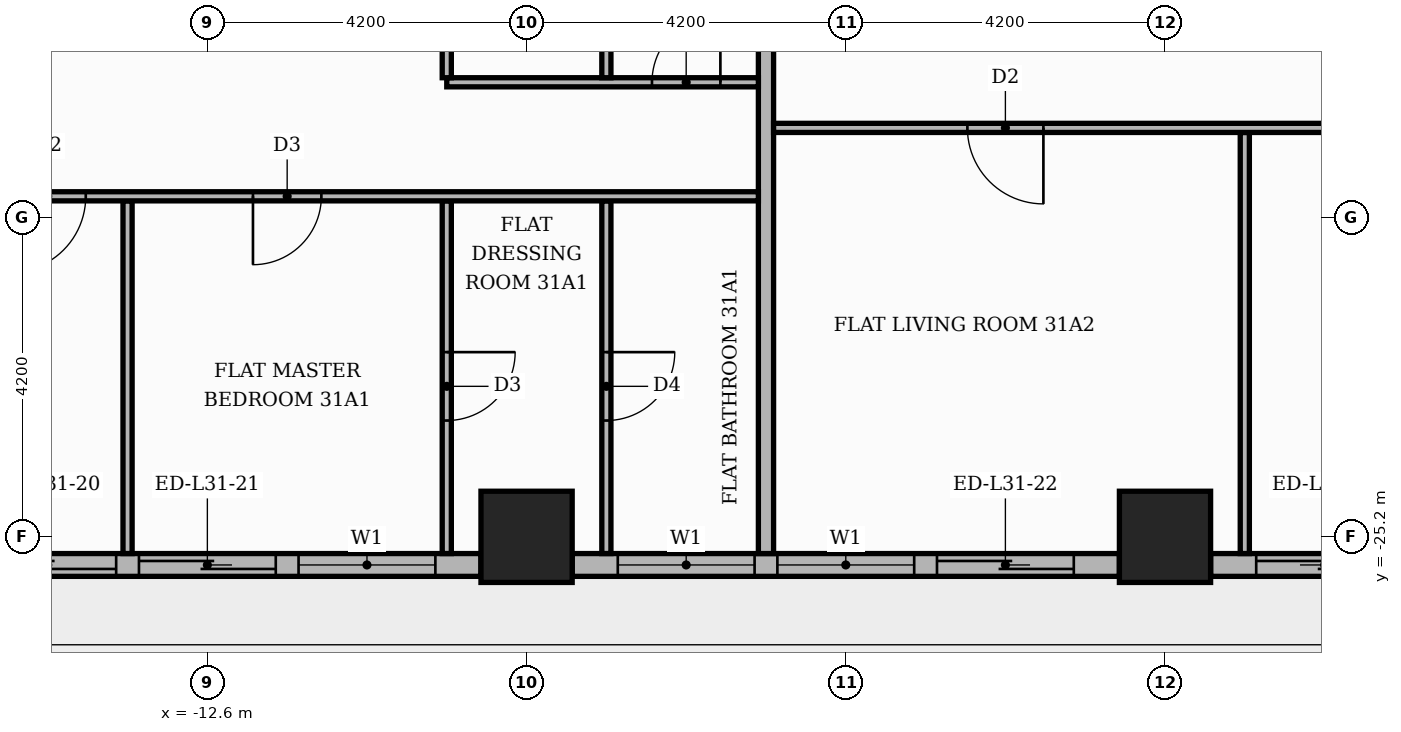
"""IFC4 building model, lengths in metres.
Left out: names, types, materials, properties, quantities, classifications, styles, units other than length and angle.
Written with IfcOpenShell. Run it as: python <this file> out.ifc"""

import sys

from ifc_helpers import new_model, si_unit, direction, frame, frame_2d, origin, origin_2d, place, context, subcontext, project, spatial, rectangle, extrude, element, fill, save


model = new_model("IFC4")
c1 = context("Model", 3, precision=1e-05, world=origin(), true_north=direction((0.0, 1.0)))
c2 = subcontext(c1, "Body", "Model", "MODEL_VIEW")
j1 = project(units=[si_unit("LENGTHUNIT", "METRE"), si_unit("PLANEANGLEUNIT", "RADIAN")], contexts=[c1])
p1 = place(None, origin())
s1 = spatial("IfcSite", under=j1, at=p1, CompositionType="ELEMENT")
p2 = place(p1, origin())
s2 = spatial("IfcBuilding", under=s1, at=p2, CompositionType="ELEMENT")
p3 = place(p2, frame((0.0, 0.0, 133.8)))
s3 = spatial("IfcBuildingStorey", under=s2, at=p3, CompositionType="ELEMENT", Elevation=133.8)
for number, where, z_axis, x_axis in (
    (1, (0.0, -25.2, 0.0), (0.0, 0.0, 1.0), (1.0, 0.0, 0.0)),
    (2, (-8.4, -25.2, 0.0), (0.0, 0.0, 1.0), (1.0, 0.0, 0.0)),
):
    element("IfcColumn", number, at=place(p3, frame(where, z_axis=z_axis, x_axis=x_axis)), inside=s3, PredefinedType="COLUMN", context=c2, shape_type="SweptSolid", body=[
        extrude(rectangle(XDim=1.2, YDim=1.2, at=origin_2d()), origin(), (0.0, 0.0, 1.0), 3.9),
    ])
p4 = place(p3, frame((-16.2, -25.57, 0.0), z_axis=(0.0, 0.0, 1.0), x_axis=(1.0, 0.0, 0.0)))
e3 = element("IfcWall", 3, at=p4, inside=s3, PredefinedType="STANDARD", context=c2, shape_type="SweptSolid", body=[
    extrude(rectangle(XDim=7.2, YDim=0.3, at=frame_2d((3.6, 0.0))), origin(), (0.0, 0.0, 1.0), 3.48),
])
p5 = place(p4, frame((0.6, 0.0, 0.0)))
e4 = element("IfcOpeningElement", 4, at=p5, cuts=e3, PredefinedType="OPENING", context=c2, shape_type="SweptSolid", body=[
    extrude(rectangle(XDim=1.8, YDim=2.4, at=frame_2d((0.9, 1.2))), frame((0.0, 0.16, 0.0), z_axis=(0.0, -1.0, 0.0), x_axis=(1.0, 0.0, 0.0)), (0.0, 0.0, 1.0), 0.32),
])
p6 = place(p4, frame((2.7, 0.0, 0.0)))
e5 = element("IfcOpeningElement", 5, at=p6, cuts=e3, PredefinedType="OPENING", context=c2, shape_type="SweptSolid", body=[
    extrude(rectangle(XDim=1.8, YDim=2.4, at=frame_2d((0.9, 1.2))), frame((0.0, 0.16, 0.0), z_axis=(0.0, -1.0, 0.0), x_axis=(1.0, 0.0, 0.0)), (0.0, 0.0, 1.0), 0.32),
])
p7 = place(p4, frame((4.8, 0.0, 0.9)))
e6 = element("IfcOpeningElement", 6, at=p7, cuts=e3, PredefinedType="OPENING", context=c2, shape_type="SweptSolid", body=[
    extrude(rectangle(XDim=1.8, YDim=2.1, at=frame_2d((0.9, 1.05))), frame((0.0, 0.16, 0.0), z_axis=(0.0, -1.0, 0.0), x_axis=(1.0, 0.0, 0.0)), (0.0, 0.0, 1.0), 0.32),
])
p8 = place(p3, frame((-7.8, -25.57, 0.0), z_axis=(0.0, 0.0, 1.0), x_axis=(1.0, 0.0, 0.0)))
e7 = element("IfcWall", 7, at=p8, inside=s3, PredefinedType="STANDARD", context=c2, shape_type="SweptSolid", body=[
    extrude(rectangle(XDim=7.2, YDim=0.3, at=frame_2d((3.6, 0.0))), origin(), (0.0, 0.0, 1.0), 3.48),
])
p9 = place(p8, frame((0.6, 0.0, 0.9)))
e8 = element("IfcOpeningElement", 8, at=p9, cuts=e7, PredefinedType="OPENING", context=c2, shape_type="SweptSolid", body=[
    extrude(rectangle(XDim=1.8, YDim=2.1, at=frame_2d((0.9, 1.05))), frame((0.0, 0.16, 0.0), z_axis=(0.0, -1.0, 0.0), x_axis=(1.0, 0.0, 0.0)), (0.0, 0.0, 1.0), 0.32),
])
p10 = place(p8, frame((2.7, 0.0, 0.9)))
e9 = element("IfcOpeningElement", 9, at=p10, cuts=e7, PredefinedType="OPENING", context=c2, shape_type="SweptSolid", body=[
    extrude(rectangle(XDim=1.8, YDim=2.1, at=frame_2d((0.9, 1.05))), frame((0.0, 0.16, 0.0), z_axis=(0.0, -1.0, 0.0), x_axis=(1.0, 0.0, 0.0)), (0.0, 0.0, 1.0), 0.32),
])
p11 = place(p8, frame((4.8, 0.0, 0.0)))
e10 = element("IfcOpeningElement", 10, at=p11, cuts=e7, PredefinedType="OPENING", context=c2, shape_type="SweptSolid", body=[
    extrude(rectangle(XDim=1.8, YDim=2.4, at=frame_2d((0.9, 1.2))), frame((0.0, 0.16, 0.0), z_axis=(0.0, -1.0, 0.0), x_axis=(1.0, 0.0, 0.0)), (0.0, 0.0, 1.0), 0.32),
])
p12 = place(p3, frame((0.6, -25.57, 0.0), z_axis=(0.0, 0.0, 1.0), x_axis=(1.0, 0.0, 0.0)))
e11 = element("IfcWall", 11, at=p12, inside=s3, PredefinedType="STANDARD", context=c2, shape_type="SweptSolid", body=[
    extrude(rectangle(XDim=7.2, YDim=0.3, at=frame_2d((3.6, 0.0))), origin(), (0.0, 0.0, 1.0), 3.48),
])
p13 = place(p12, frame((0.6, 0.0, 0.0)))
e12 = element("IfcOpeningElement", 12, at=p13, cuts=e11, PredefinedType="OPENING", context=c2, shape_type="SweptSolid", body=[
    extrude(rectangle(XDim=1.8, YDim=2.4, at=frame_2d((0.9, 1.2))), frame((0.0, 0.16, 0.0), z_axis=(0.0, -1.0, 0.0), x_axis=(1.0, 0.0, 0.0)), (0.0, 0.0, 1.0), 0.32),
])
p14 = place(p12, frame((2.7, 0.0, 0.9)))
e13 = element("IfcOpeningElement", 13, at=p14, cuts=e11, PredefinedType="OPENING", context=c2, shape_type="SweptSolid", body=[
    extrude(rectangle(XDim=1.8, YDim=2.1, at=frame_2d((0.9, 1.05))), frame((0.0, 0.16, 0.0), z_axis=(0.0, -1.0, 0.0), x_axis=(1.0, 0.0, 0.0)), (0.0, 0.0, 1.0), 0.32),
])
p15 = place(p12, frame((4.8, 0.0, 0.9)))
e14 = element("IfcOpeningElement", 14, at=p15, cuts=e11, PredefinedType="OPENING", context=c2, shape_type="SweptSolid", body=[
    extrude(rectangle(XDim=1.8, YDim=2.1, at=frame_2d((0.9, 1.05))), frame((0.0, 0.16, 0.0), z_axis=(0.0, -1.0, 0.0), x_axis=(1.0, 0.0, 0.0)), (0.0, 0.0, 1.0), 0.32),
])
p16 = place(p3, frame((-13.65, -25.42, 0.0), z_axis=(0.0, 0.0, 1.0), x_axis=(0.0, 1.0, 0.0)))
e15 = element("IfcWall", 15, at=p16, inside=s3, PredefinedType="PARTITIONING", context=c2, shape_type="SweptSolid", body=[
    extrude(rectangle(XDim=4.64, YDim=0.12, at=frame_2d((2.32, 0.0))), origin(), (0.0, 0.0, 1.0), 3.48),
])
p17 = place(p3, frame((-9.45, -25.42, 0.0), z_axis=(0.0, 0.0, 1.0), x_axis=(0.0, 1.0, 0.0)))
e16 = element("IfcWall", 16, at=p17, inside=s3, PredefinedType="PARTITIONING", context=c2, shape_type="SweptSolid", body=[
    extrude(rectangle(XDim=4.64, YDim=0.12, at=frame_2d((2.32, 0.0))), origin(), (0.0, 0.0, 1.0), 3.48),
])
p18 = place(p17, frame((1.75, 0.0, 0.0)))
e17 = element("IfcOpeningElement", 17, at=p18, cuts=e16, PredefinedType="OPENING", context=c2, shape_type="SweptSolid", body=[
    extrude(rectangle(XDim=0.9, YDim=2.1, at=frame_2d((0.45, 1.05))), frame((0.0, 0.07, 0.0), z_axis=(0.0, -1.0, 0.0), x_axis=(1.0, 0.0, 0.0)), (0.0, 0.0, 1.0), 0.14),
])
p19 = place(p3, frame((-7.35, -25.42, 0.0), z_axis=(0.0, 0.0, 1.0), x_axis=(0.0, 1.0, 0.0)))
e18 = element("IfcWall", 18, at=p19, inside=s3, PredefinedType="PARTITIONING", context=c2, shape_type="SweptSolid", body=[
    extrude(rectangle(XDim=4.64, YDim=0.12, at=frame_2d((2.32, 0.0))), origin(), (0.0, 0.0, 1.0), 3.48),
])
p20 = place(p19, frame((1.75, 0.0, 0.0)))
e19 = element("IfcOpeningElement", 19, at=p20, cuts=e18, PredefinedType="OPENING", context=c2, shape_type="SweptSolid", body=[
    extrude(rectangle(XDim=0.9, YDim=2.1, at=frame_2d((0.45, 1.05))), frame((0.0, 0.07, 0.0), z_axis=(0.0, -1.0, 0.0), x_axis=(1.0, 0.0, 0.0)), (0.0, 0.0, 1.0), 0.14),
])
p21 = place(p3, frame((-5.25, -25.42, 0.0), z_axis=(0.0, 0.0, 1.0), x_axis=(0.0, 1.0, 0.0)))
e20 = element("IfcWall", 20, at=p21, inside=s3, PredefinedType="PARTITIONING", context=c2, shape_type="SweptSolid", body=[
    extrude(rectangle(XDim=11.67, YDim=0.2, at=frame_2d((5.835, 0.0))), origin(), (0.0, 0.0, 1.0), 3.48),
])
p22 = place(p3, frame((1.05, -25.42, 0.0), z_axis=(0.0, 0.0, 1.0), x_axis=(0.0, 1.0, 0.0)))
e21 = element("IfcWall", 21, at=p22, inside=s3, PredefinedType="PARTITIONING", context=c2, shape_type="SweptSolid", body=[
    extrude(rectangle(XDim=5.54, YDim=0.12, at=frame_2d((2.77, 0.0))), origin(), (0.0, 0.0, 1.0), 3.48),
])
p23 = place(p3, frame((-25.42, -20.72, 0.0), z_axis=(0.0, 0.0, 1.0), x_axis=(1.0, 0.0, 0.0)))
e22 = element("IfcWall", 22, at=p23, inside=s3, PredefinedType="PARTITIONING", context=c2, shape_type="SweptSolid", body=[
    extrude(rectangle(XDim=20.07, YDim=0.12, at=frame_2d((10.035, 0.0))), origin(), (0.0, 0.0, 1.0), 3.48),
])
p24 = place(p23, frame((10.22, 0.0, 0.0)))
e23 = element("IfcOpeningElement", 23, at=p24, cuts=e22, PredefinedType="OPENING", context=c2, shape_type="SweptSolid", body=[
    extrude(rectangle(XDim=1.0, YDim=2.1, at=frame_2d((0.5, 1.05))), frame((0.0, 0.07, 0.0), z_axis=(0.0, -1.0, 0.0), x_axis=(1.0, 0.0, 0.0)), (0.0, 0.0, 1.0), 0.14),
])
p25 = place(p23, frame((13.42, 0.0, 0.0)))
e24 = element("IfcOpeningElement", 24, at=p25, cuts=e22, PredefinedType="OPENING", context=c2, shape_type="SweptSolid", body=[
    extrude(rectangle(XDim=0.9, YDim=2.1, at=frame_2d((0.45, 1.05))), frame((0.0, 0.07, 0.0), z_axis=(0.0, -1.0, 0.0), x_axis=(1.0, 0.0, 0.0)), (0.0, 0.0, 1.0), 0.14),
])
p26 = place(p3, frame((-5.15, -19.82, 0.0), z_axis=(0.0, 0.0, 1.0), x_axis=(1.0, 0.0, 0.0)))
e25 = element("IfcWall", 25, at=p26, inside=s3, PredefinedType="PARTITIONING", context=c2, shape_type="SweptSolid", body=[
    extrude(rectangle(XDim=18.7, YDim=0.12, at=frame_2d((9.35, 0.0))), origin(), (0.0, 0.0, 1.0), 3.48),
])
p27 = place(p26, frame((2.55, 0.0, 0.0)))
e26 = element("IfcOpeningElement", 26, at=p27, cuts=e25, PredefinedType="OPENING", context=c2, shape_type="SweptSolid", body=[
    extrude(rectangle(XDim=1.0, YDim=2.1, at=frame_2d((0.5, 1.05))), frame((0.0, 0.07, 0.0), z_axis=(0.0, -1.0, 0.0), x_axis=(1.0, 0.0, 0.0)), (0.0, 0.0, 1.0), 0.14),
])
p28 = place(p26, frame((7.85, 0.0, 0.0)))
e27 = element("IfcOpeningElement", 27, at=p28, cuts=e25, PredefinedType="OPENING", context=c2, shape_type="SweptSolid", body=[
    extrude(rectangle(XDim=0.9, YDim=2.1, at=frame_2d((0.45, 1.05))), frame((0.0, 0.07, 0.0), z_axis=(0.0, -1.0, 0.0), x_axis=(1.0, 0.0, 0.0)), (0.0, 0.0, 1.0), 0.14),
])
p29 = place(p26, frame((16.25, 0.0, 0.0)))
e28 = element("IfcOpeningElement", 28, at=p29, cuts=e25, PredefinedType="OPENING", context=c2, shape_type="SweptSolid", body=[
    extrude(rectangle(XDim=0.9, YDim=2.1, at=frame_2d((0.45, 1.05))), frame((0.0, 0.07, 0.0), z_axis=(0.0, -1.0, 0.0), x_axis=(1.0, 0.0, 0.0)), (0.0, 0.0, 1.0), 0.14),
])
p30 = place(p3, frame((-9.45, -19.22, 0.0), z_axis=(0.0, 0.0, 1.0), x_axis=(1.0, 0.0, 0.0)))
e29 = element("IfcWall", 29, at=p30, inside=s3, PredefinedType="PARTITIONING", context=c2, shape_type="SweptSolid", body=[
    extrude(rectangle(XDim=4.1, YDim=0.12, at=frame_2d((2.05, 0.0))), origin(), (0.0, 0.0, 1.0), 3.48),
])
p31 = place(p30, frame((2.7, 0.0, 0.0)))
e30 = element("IfcOpeningElement", 30, at=p31, cuts=e29, PredefinedType="OPENING", context=c2, shape_type="SweptSolid", body=[
    extrude(rectangle(XDim=0.9, YDim=2.1, at=frame_2d((0.45, 1.05))), frame((0.0, 0.07, 0.0), z_axis=(0.0, -1.0, 0.0), x_axis=(1.0, 0.0, 0.0)), (0.0, 0.0, 1.0), 0.14),
])
p32 = place(p3, frame((-9.45, -19.16, 0.0), z_axis=(0.0, 0.0, 1.0), x_axis=(0.0, 1.0, 0.0)))
e31 = element("IfcWall", 31, at=p32, inside=s3, PredefinedType="PARTITIONING", context=c2, shape_type="SweptSolid", body=[
    extrude(rectangle(XDim=5.41, YDim=0.12, at=frame_2d((2.705, 0.0))), origin(), (0.0, 0.0, 1.0), 3.48),
])
p33 = place(p32, frame((2.275, 0.0, 0.0)))
e32 = element("IfcOpeningElement", 32, at=p33, cuts=e31, PredefinedType="OPENING", context=c2, shape_type="SweptSolid", body=[
    extrude(rectangle(XDim=0.9, YDim=2.1, at=frame_2d((0.45, 1.05))), frame((0.0, 0.07, 0.0), z_axis=(0.0, -1.0, 0.0), x_axis=(1.0, 0.0, 0.0)), (0.0, 0.0, 1.0), 0.14),
])
p34 = place(p3, frame((-7.35, -19.16, 0.0), z_axis=(0.0, 0.0, 1.0), x_axis=(0.0, 1.0, 0.0)))
e33 = element("IfcWall", 33, at=p34, inside=s3, PredefinedType="PARTITIONING", context=c2, shape_type="SweptSolid", body=[
    extrude(rectangle(XDim=5.41, YDim=0.12, at=frame_2d((2.705, 0.0))), origin(), (0.0, 0.0, 1.0), 3.48),
])
p35 = place(p5, origin())
e34 = element("IfcDoor", 34, at=p35, inside=s3, OperationType="SLIDING_TO_LEFT", PredefinedType="DOOR", context=c2, shape_type="SweptSolid", body=[
    extrude(rectangle(XDim=1.8, YDim=2.4, at=frame_2d((0.9, 1.2))), frame((0.0, 0.025, 0.0), z_axis=(0.0, -1.0, 0.0), x_axis=(1.0, 0.0, 0.0)), (0.0, 0.0, 1.0), 0.05),
])
fill(e4, e34)
p36 = place(p6, origin())
e35 = element("IfcDoor", 35, at=p36, inside=s3, OperationType="SLIDING_TO_RIGHT", PredefinedType="DOOR", context=c2, shape_type="SweptSolid", body=[
    extrude(rectangle(XDim=1.8, YDim=2.4, at=frame_2d((0.9, 1.2))), frame((0.0, 0.025, 0.0), z_axis=(0.0, -1.0, 0.0), x_axis=(1.0, 0.0, 0.0)), (0.0, 0.0, 1.0), 0.05),
])
fill(e5, e35)
p37 = place(p7, origin())
e36 = element("IfcWindow", 36, at=p37, inside=s3, PartitioningType="SINGLE_PANEL", PredefinedType="WINDOW", context=c2, shape_type="SweptSolid", body=[
    extrude(rectangle(XDim=1.8, YDim=2.1, at=frame_2d((0.9, 1.05))), frame((0.0, 0.03, 0.0), z_axis=(0.0, -1.0, 0.0), x_axis=(1.0, 0.0, 0.0)), (0.0, 0.0, 1.0), 0.06),
])
fill(e6, e36)
p38 = place(p9, origin())
e37 = element("IfcWindow", 37, at=p38, inside=s3, PartitioningType="SINGLE_PANEL", PredefinedType="WINDOW", context=c2, shape_type="SweptSolid", body=[
    extrude(rectangle(XDim=1.8, YDim=2.1, at=frame_2d((0.9, 1.05))), frame((0.0, 0.03, 0.0), z_axis=(0.0, -1.0, 0.0), x_axis=(1.0, 0.0, 0.0)), (0.0, 0.0, 1.0), 0.06),
])
fill(e8, e37)
p39 = place(p10, origin())
e38 = element("IfcWindow", 38, at=p39, inside=s3, PartitioningType="SINGLE_PANEL", PredefinedType="WINDOW", context=c2, shape_type="SweptSolid", body=[
    extrude(rectangle(XDim=1.8, YDim=2.1, at=frame_2d((0.9, 1.05))), frame((0.0, 0.03, 0.0), z_axis=(0.0, -1.0, 0.0), x_axis=(1.0, 0.0, 0.0)), (0.0, 0.0, 1.0), 0.06),
])
fill(e9, e38)
p40 = place(p11, origin())
e39 = element("IfcDoor", 39, at=p40, inside=s3, OperationType="SLIDING_TO_RIGHT", PredefinedType="DOOR", context=c2, shape_type="SweptSolid", body=[
    extrude(rectangle(XDim=1.8, YDim=2.4, at=frame_2d((0.9, 1.2))), frame((0.0, 0.025, 0.0), z_axis=(0.0, -1.0, 0.0), x_axis=(1.0, 0.0, 0.0)), (0.0, 0.0, 1.0), 0.05),
])
fill(e10, e39)
p41 = place(p13, origin())
e40 = element("IfcDoor", 40, at=p41, inside=s3, OperationType="SLIDING_TO_LEFT", PredefinedType="DOOR", context=c2, shape_type="SweptSolid", body=[
    extrude(rectangle(XDim=1.8, YDim=2.4, at=frame_2d((0.9, 1.2))), frame((0.0, 0.025, 0.0), z_axis=(0.0, -1.0, 0.0), x_axis=(1.0, 0.0, 0.0)), (0.0, 0.0, 1.0), 0.05),
])
fill(e12, e40)
p42 = place(p31, origin())
e41 = element("IfcDoor", 41, at=p42, inside=s3, OperationType="SINGLE_SWING_RIGHT", PredefinedType="DOOR", context=c2, shape_type="SweptSolid", body=[
    extrude(rectangle(XDim=0.9, YDim=2.1, at=frame_2d((0.45, 1.05))), frame((0.0, 0.025, 0.0), z_axis=(0.0, -1.0, 0.0), x_axis=(1.0, 0.0, 0.0)), (0.0, 0.0, 1.0), 0.05),
])
fill(e30, e41)
p43 = place(p24, frame((1.0, 0.0, 0.0), z_axis=(0.0, 0.0, 1.0), x_axis=(-1.0, 0.0, 0.0)))
e42 = element("IfcDoor", 42, at=p43, inside=s3, OperationType="SINGLE_SWING_LEFT", PredefinedType="DOOR", context=c2, shape_type="SweptSolid", body=[
    extrude(rectangle(XDim=1.0, YDim=2.1, at=frame_2d((0.5, 1.05))), frame((0.0, 0.025, 0.0), z_axis=(0.0, -1.0, 0.0), x_axis=(1.0, 0.0, 0.0)), (0.0, 0.0, 1.0), 0.05),
])
fill(e23, e42)
p44 = place(p25, frame((0.9, 0.0, 0.0), z_axis=(0.0, 0.0, 1.0), x_axis=(-1.0, 0.0, 0.0)))
e43 = element("IfcDoor", 43, at=p44, inside=s3, OperationType="SINGLE_SWING_LEFT", PredefinedType="DOOR", context=c2, shape_type="SweptSolid", body=[
    extrude(rectangle(XDim=0.9, YDim=2.1, at=frame_2d((0.45, 1.05))), frame((0.0, 0.025, 0.0), z_axis=(0.0, -1.0, 0.0), x_axis=(1.0, 0.0, 0.0)), (0.0, 0.0, 1.0), 0.05),
])
fill(e24, e43)
p45 = place(p18, frame((0.9, 0.0, 0.0), z_axis=(0.0, 0.0, 1.0), x_axis=(-1.0, 0.0, 0.0)))
e44 = element("IfcDoor", 44, at=p45, inside=s3, OperationType="SINGLE_SWING_RIGHT", PredefinedType="DOOR", context=c2, shape_type="SweptSolid", body=[
    extrude(rectangle(XDim=0.9, YDim=2.1, at=frame_2d((0.45, 1.05))), frame((0.0, 0.025, 0.0), z_axis=(0.0, -1.0, 0.0), x_axis=(1.0, 0.0, 0.0)), (0.0, 0.0, 1.0), 0.05),
])
fill(e17, e44)
p46 = place(p20, frame((0.9, 0.0, 0.0), z_axis=(0.0, 0.0, 1.0), x_axis=(-1.0, 0.0, 0.0)))
e45 = element("IfcDoor", 45, at=p46, inside=s3, OperationType="SINGLE_SWING_RIGHT", PredefinedType="DOOR", context=c2, shape_type="SweptSolid", body=[
    extrude(rectangle(XDim=0.9, YDim=2.1, at=frame_2d((0.45, 1.05))), frame((0.0, 0.025, 0.0), z_axis=(0.0, -1.0, 0.0), x_axis=(1.0, 0.0, 0.0)), (0.0, 0.0, 1.0), 0.05),
])
fill(e19, e45)
p47 = place(p27, frame((1.0, 0.0, 0.0), z_axis=(0.0, 0.0, 1.0), x_axis=(-1.0, 0.0, 0.0)))
e46 = element("IfcDoor", 46, at=p47, inside=s3, OperationType="SINGLE_SWING_RIGHT", PredefinedType="DOOR", context=c2, shape_type="SweptSolid", body=[
    extrude(rectangle(XDim=1.0, YDim=2.1, at=frame_2d((0.5, 1.05))), frame((0.0, 0.025, 0.0), z_axis=(0.0, -1.0, 0.0), x_axis=(1.0, 0.0, 0.0)), (0.0, 0.0, 1.0), 0.05),
])
fill(e26, e46)
save(model, sys.argv[1])
